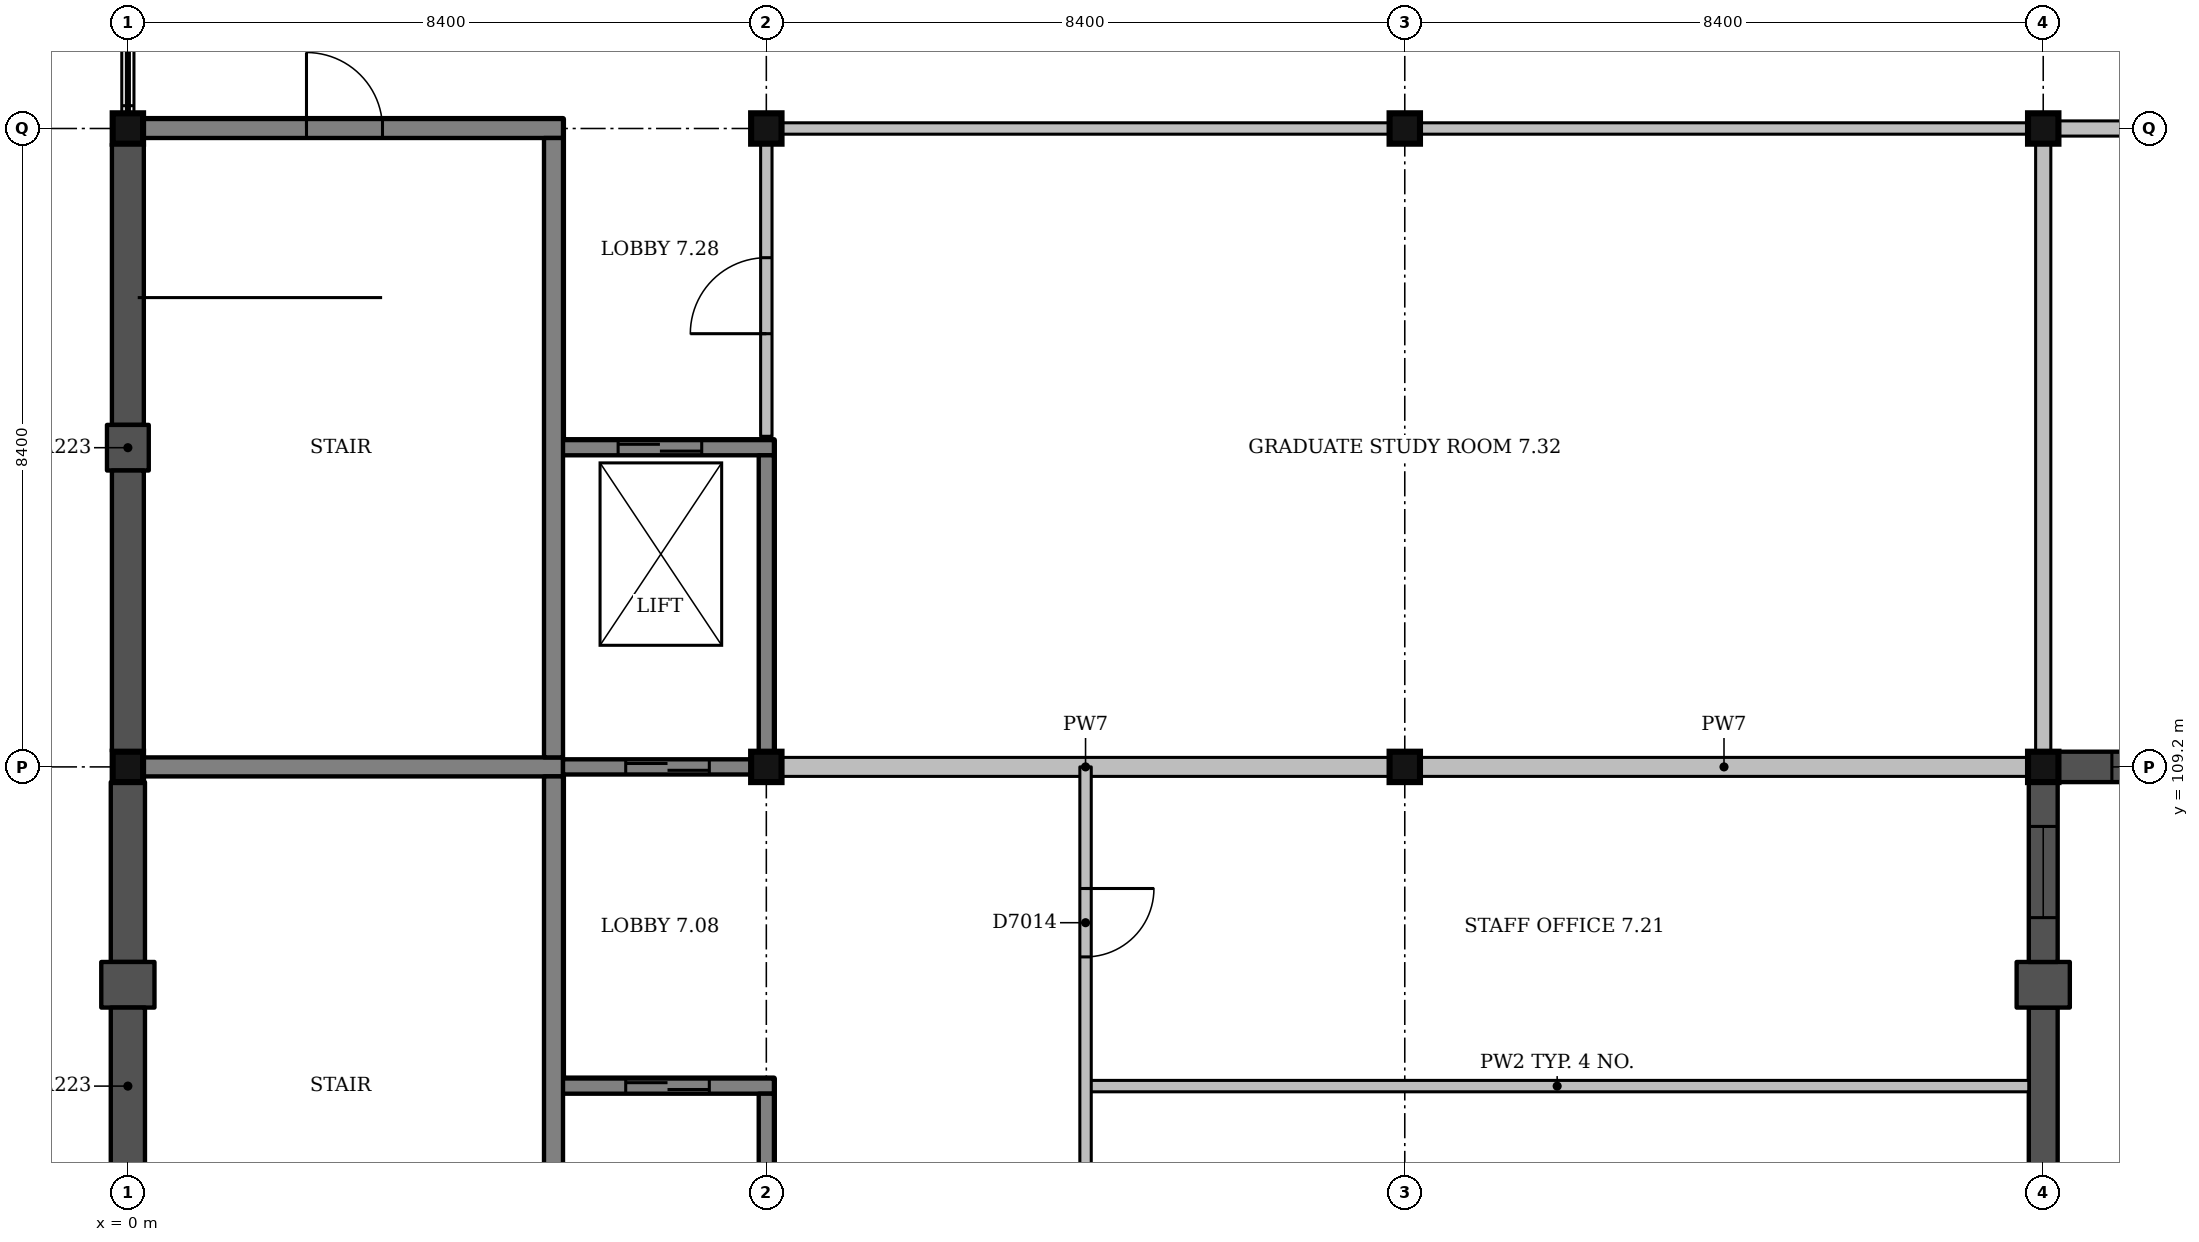
"""IFC4 building model, lengths in metres.
Left out: names, types, materials, properties, quantities, classifications, styles, units other than length and angle.
Written with IfcOpenShell. Run it as: python <this file> out.ifc"""

import sys

from ifc_helpers import new_model, si_unit, direction, frame, frame_2d, origin, origin_2d, place, context, subcontext, project, spatial, rectangle, extrude, element, fill, save


model = new_model("IFC4")
c1 = context("Model", 3, precision=1e-05, world=origin(), true_north=direction((0.0, 1.0)))
c2 = subcontext(c1, "Body", "Model", "MODEL_VIEW")
j1 = project(units=[si_unit("LENGTHUNIT", "METRE"), si_unit("PLANEANGLEUNIT", "RADIAN")], contexts=[c1])
p1 = place(None, origin())
s1 = spatial("IfcSite", under=j1, at=p1, CompositionType="ELEMENT")
p2 = place(p1, origin())
s2 = spatial("IfcBuilding", under=s1, at=p2, CompositionType="ELEMENT")
p3 = place(p2, frame((0.0, 0.0, 31.5)))
s3 = spatial("IfcBuildingStorey", under=s2, at=p3, CompositionType="ELEMENT", Elevation=31.5)
for number, where, z_axis, x_axis in (
    (1, (0.0, 109.2, 0.0), (0.0, 0.0, 1.0), (1.0, 0.0, 0.0)),
    (2, (8.4, 109.2, 0.0), (0.0, 0.0, 1.0), (1.0, 0.0, 0.0)),
    (3, (16.8, 109.2, 0.0), (0.0, 0.0, 1.0), (1.0, 0.0, 0.0)),
    (4, (25.2, 109.2, 0.0), (0.0, 0.0, 1.0), (1.0, 0.0, 0.0)),
    (5, (0.0, 117.6, 0.0), (0.0, 0.0, 1.0), (1.0, 0.0, 0.0)),
    (6, (8.4, 117.6, 0.0), (0.0, 0.0, 1.0), (1.0, 0.0, 0.0)),
    (7, (16.8, 117.6, 0.0), (0.0, 0.0, 1.0), (1.0, 0.0, 0.0)),
    (8, (25.2, 117.6, 0.0), (0.0, 0.0, 1.0), (1.0, 0.0, 0.0)),
):
    element("IfcColumn", number, at=place(p3, frame(where, z_axis=z_axis, x_axis=x_axis)), inside=s3, PredefinedType="COLUMN", context=c2, shape_type="SweptSolid", body=[
        extrude(rectangle(XDim=0.4, YDim=0.4, at=origin_2d()), origin(), (0.0, 0.0, 1.0), 4.5),
    ])
p4 = place(p3, frame((5.5, 105.0, 0.0), z_axis=(0.0, 0.0, 1.0), x_axis=(1.0, 0.0, 0.0)))
e9 = element("IfcWall", 9, at=p4, inside=s3, PredefinedType="SHEAR", context=c2, shape_type="SweptSolid", body=[
    extrude(rectangle(XDim=3.0, YDim=0.2, at=frame_2d((1.5, 0.0))), origin(), (0.0, 0.0, 1.0), 4.5),
])
p5 = place(p4, frame((1.05, 0.0, 0.0)))
e10 = element("IfcOpeningElement", 10, at=p5, cuts=e9, PredefinedType="OPENING", context=c2, shape_type="SweptSolid", body=[
    extrude(rectangle(XDim=1.1, YDim=2.1, at=frame_2d((0.55, 1.05))), frame((0.0, 0.11, 0.0), z_axis=(0.0, -1.0, 0.0), x_axis=(1.0, 0.0, 0.0)), (0.0, 0.0, 1.0), 0.22),
])
p6 = place(p3, frame((8.4, 101.0, 0.0), z_axis=(0.0, 0.0, 1.0), x_axis=(0.0, 1.0, 0.0)))
e11 = element("IfcWall", 11, at=p6, inside=s3, PredefinedType="SHEAR", context=c2, shape_type="SweptSolid", body=[
    extrude(rectangle(XDim=3.9, YDim=0.2, at=frame_2d((1.95, 0.0))), origin(), (0.0, 0.0, 1.0), 4.5),
])
p7 = place(p3, frame((5.5, 113.4, 0.0), z_axis=(0.0, 0.0, 1.0), x_axis=(1.0, 0.0, 0.0)))
e12 = element("IfcWall", 12, at=p7, inside=s3, PredefinedType="SHEAR", context=c2, shape_type="SweptSolid", body=[
    extrude(rectangle(XDim=3.0, YDim=0.2, at=frame_2d((1.5, 0.0))), origin(), (0.0, 0.0, 1.0), 4.5),
])
p8 = place(p7, frame((0.95, 0.0, 0.0)))
e13 = element("IfcOpeningElement", 13, at=p8, cuts=e12, PredefinedType="OPENING", context=c2, shape_type="SweptSolid", body=[
    extrude(rectangle(XDim=1.1, YDim=2.1, at=frame_2d((0.55, 1.05))), frame((0.0, 0.11, 0.0), z_axis=(0.0, -1.0, 0.0), x_axis=(1.0, 0.0, 0.0)), (0.0, 0.0, 1.0), 0.22),
])
p9 = place(p3, frame((8.4, 109.4, 0.0), z_axis=(0.0, 0.0, 1.0), x_axis=(0.0, 1.0, 0.0)))
e14 = element("IfcWall", 14, at=p9, inside=s3, PredefinedType="SHEAR", context=c2, shape_type="SweptSolid", body=[
    extrude(rectangle(XDim=3.9, YDim=0.2, at=frame_2d((1.95, 0.0))), origin(), (0.0, 0.0, 1.0), 4.5),
])
p10 = place(p3, frame((0.2, 109.2, 0.0), z_axis=(0.0, 0.0, 1.0), x_axis=(1.0, 0.0, 0.0)))
e15 = element("IfcWall", 15, at=p10, inside=s3, PredefinedType="SHEAR", context=c2, shape_type="SweptSolid", body=[
    extrude(rectangle(XDim=5.525, YDim=0.25, at=frame_2d((2.763, 0.0))), origin(), (0.0, 0.0, 1.0), 4.2),
])
p11 = place(p3, frame((5.6, 100.925, 0.0), z_axis=(0.0, 0.0, 1.0), x_axis=(0.0, 1.0, 0.0)))
e16 = element("IfcWall", 16, at=p11, inside=s3, PredefinedType="SHEAR", context=c2, shape_type="SweptSolid", body=[
    extrude(rectangle(XDim=8.15, YDim=0.25, at=frame_2d((4.075, 0.0))), origin(), (0.0, 0.0, 1.0), 4.2),
])
p12 = place(p3, frame((0.2, 117.6, 0.0), z_axis=(0.0, 0.0, 1.0), x_axis=(1.0, 0.0, 0.0)))
e17 = element("IfcWall", 17, at=p12, inside=s3, PredefinedType="SHEAR", context=c2, shape_type="SweptSolid", body=[
    extrude(rectangle(XDim=5.525, YDim=0.25, at=frame_2d((2.763, 0.0))), origin(), (0.0, 0.0, 1.0), 4.2),
])
p13 = place(p12, frame((2.15, 0.0, 0.0)))
e18 = element("IfcOpeningElement", 18, at=p13, cuts=e17, PredefinedType="OPENING", context=c2, shape_type="SweptSolid", body=[
    extrude(rectangle(XDim=1.0, YDim=2.1, at=frame_2d((0.5, 1.05))), frame((0.0, 0.135, 0.0), z_axis=(0.0, -1.0, 0.0), x_axis=(1.0, 0.0, 0.0)), (0.0, 0.0, 1.0), 0.27),
])
p14 = place(p3, frame((5.6, 109.325, 0.0), z_axis=(0.0, 0.0, 1.0), x_axis=(0.0, 1.0, 0.0)))
e19 = element("IfcWall", 19, at=p14, inside=s3, PredefinedType="SHEAR", context=c2, shape_type="SweptSolid", body=[
    extrude(rectangle(XDim=8.15, YDim=0.25, at=frame_2d((4.075, 0.0))), origin(), (0.0, 0.0, 1.0), 4.2),
])
p15 = place(p3, frame((25.2, 103.967, 0.0), z_axis=(0.0, 0.0, 1.0), x_axis=(0.0, 1.0, 0.0)))
e20 = element("IfcWall", 20, at=p15, inside=s3, PredefinedType="SOLIDWALL", context=c2, shape_type="SweptSolid", body=[
    extrude(rectangle(XDim=2.066, YDim=0.38, at=frame_2d((1.033, 0.0))), origin(), (0.0, 0.0, 1.0), 3.6),
])
p16 = place(p3, frame((25.2, 106.033, 0.0), z_axis=(0.0, 0.0, 1.0), x_axis=(0.0, 1.0, 0.0)))
e21 = element("IfcWall", 21, at=p16, inside=s3, PredefinedType="SOLIDWALL", context=c2, shape_type="SweptSolid", body=[
    extrude(rectangle(XDim=0.6, YDim=0.7, at=frame_2d((0.3, 0.0))), origin(), (0.0, 0.0, 1.0), 3.6),
])
p17 = place(p3, frame((25.2, 106.633, 0.0), z_axis=(0.0, 0.0, 1.0), x_axis=(0.0, 1.0, 0.0)))
e22 = element("IfcWall", 22, at=p17, inside=s3, PredefinedType="SOLIDWALL", context=c2, shape_type="SweptSolid", body=[
    extrude(rectangle(XDim=2.367, YDim=0.38, at=frame_2d((1.183, 0.0))), origin(), (0.0, 0.0, 1.0), 3.6),
])
p18 = place(p17, frame((0.583, 0.0, 0.9)))
e23 = element("IfcOpeningElement", 23, at=p18, cuts=e22, PredefinedType="OPENING", context=c2, shape_type="SweptSolid", body=[
    extrude(rectangle(XDim=1.2, YDim=2.1, at=frame_2d((0.6, 1.05))), frame((0.0, 0.2, 0.0), z_axis=(0.0, -1.0, 0.0), x_axis=(1.0, 0.0, 0.0)), (0.0, 0.0, 1.0), 0.4),
])
p19 = place(p3, frame((0.0, 109.0, 0.0), z_axis=(0.0, 0.0, 1.0), x_axis=(0.0, -1.0, 0.0)))
e24 = element("IfcWall", 24, at=p19, inside=s3, PredefinedType="SOLIDWALL", context=c2, shape_type="SweptSolid", body=[
    extrude(rectangle(XDim=2.367, YDim=0.45, at=frame_2d((1.183, 0.0))), origin(), (0.0, 0.0, 1.0), 4.2),
])
p20 = place(p3, frame((0.0, 106.633, 0.0), z_axis=(0.0, 0.0, 1.0), x_axis=(0.0, -1.0, 0.0)))
e25 = element("IfcWall", 25, at=p20, inside=s3, PredefinedType="SOLIDWALL", context=c2, shape_type="SweptSolid", body=[
    extrude(rectangle(XDim=0.6, YDim=0.7, at=frame_2d((0.3, 0.0))), origin(), (0.0, 0.0, 1.0), 4.2),
])
p21 = place(p3, frame((0.0, 106.033, 0.0), z_axis=(0.0, 0.0, 1.0), x_axis=(0.0, -1.0, 0.0)))
e26 = element("IfcWall", 26, at=p21, inside=s3, PredefinedType="SOLIDWALL", context=c2, shape_type="SweptSolid", body=[
    extrude(rectangle(XDim=2.066, YDim=0.45, at=frame_2d((1.033, 0.0))), origin(), (0.0, 0.0, 1.0), 4.2),
])
p22 = place(p3, frame((0.0, 117.4, 0.0), z_axis=(0.0, 0.0, 1.0), x_axis=(0.0, -1.0, 0.0)))
e27 = element("IfcWall", 27, at=p22, inside=s3, PredefinedType="SOLIDWALL", context=c2, shape_type="SweptSolid", body=[
    extrude(rectangle(XDim=3.7, YDim=0.42, at=frame_2d((1.85, 0.0))), origin(), (0.0, 0.0, 1.0), 4.2),
])
p23 = place(p3, frame((0.0, 113.7, 0.0), z_axis=(0.0, 0.0, 1.0), x_axis=(0.0, -1.0, 0.0)))
e28 = element("IfcWall", 28, at=p23, inside=s3, PredefinedType="SOLIDWALL", context=c2, shape_type="SweptSolid", body=[
    extrude(rectangle(XDim=0.6, YDim=0.55, at=frame_2d((0.3, 0.0))), origin(), (0.0, 0.0, 1.0), 4.2),
])
p24 = place(p3, frame((0.0, 113.1, 0.0), z_axis=(0.0, 0.0, 1.0), x_axis=(0.0, -1.0, 0.0)))
e29 = element("IfcWall", 29, at=p24, inside=s3, PredefinedType="SOLIDWALL", context=c2, shape_type="SweptSolid", body=[
    extrude(rectangle(XDim=3.7, YDim=0.42, at=frame_2d((1.85, 0.0))), origin(), (0.0, 0.0, 1.0), 4.2),
])
p25 = place(p3, frame((25.4, 109.2, 0.0), z_axis=(0.0, 0.0, 1.0), x_axis=(1.0, 0.0, 0.0)))
e30 = element("IfcWall", 30, at=p25, inside=s3, PredefinedType="SOLIDWALL", context=c2, shape_type="SweptSolid", body=[
    extrude(rectangle(XDim=2.607, YDim=0.4, at=frame_2d((1.303, 0.0))), origin(), (0.0, 0.0, 1.0), 4.2),
])
p26 = place(p25, frame((0.703, 0.0, 2.4)))
e31 = element("IfcOpeningElement", 31, at=p26, cuts=e30, PredefinedType="OPENING", context=c2, shape_type="SweptSolid", body=[
    extrude(rectangle(XDim=1.2, YDim=0.6, at=frame_2d((0.6, 0.3))), frame((0.0, 0.21, 0.0), z_axis=(0.0, -1.0, 0.0), x_axis=(1.0, 0.0, 0.0)), (0.0, 0.0, 1.0), 0.42),
])
p27 = place(p3, frame((12.6, 105.0, 0.0), z_axis=(0.0, 0.0, 1.0), x_axis=(1.0, 0.0, 0.0)))
e32 = element("IfcWall", 32, at=p27, inside=s3, PredefinedType="PARTITIONING", context=c2, shape_type="SweptSolid", body=[
    extrude(rectangle(XDim=12.41, YDim=0.15, at=frame_2d((6.205, 0.0))), origin(), (0.0, 0.0, 1.0), 3.6),
])
p28 = place(p3, frame((8.6, 109.2, 0.0), z_axis=(0.0, 0.0, 1.0), x_axis=(1.0, 0.0, 0.0)))
e33 = element("IfcWall", 33, at=p28, inside=s3, PredefinedType="SOLIDWALL", context=c2, shape_type="SweptSolid", body=[
    extrude(rectangle(XDim=8.0, YDim=0.25, at=frame_2d((4.0, 0.0))), origin(), (0.0, 0.0, 1.0), 4.15),
])
p29 = place(p3, frame((17.0, 109.2, 0.0), z_axis=(0.0, 0.0, 1.0), x_axis=(1.0, 0.0, 0.0)))
e34 = element("IfcWall", 34, at=p29, inside=s3, PredefinedType="SOLIDWALL", context=c2, shape_type="SweptSolid", body=[
    extrude(rectangle(XDim=8.0, YDim=0.25, at=frame_2d((4.0, 0.0))), origin(), (0.0, 0.0, 1.0), 3.6),
])
for number, where, z_axis, x_axis in (
    (35, (8.6, 117.6, 0.0), (0.0, 0.0, 1.0), (1.0, 0.0, 0.0)),
    (36, (17.0, 117.6, 0.0), (0.0, 0.0, 1.0), (1.0, 0.0, 0.0)),
):
    element("IfcWall", number, at=place(p3, frame(where, z_axis=z_axis, x_axis=x_axis)), inside=s3, PredefinedType="PARTITIONING", context=c2, shape_type="SweptSolid", body=[
        extrude(rectangle(XDim=8.0, YDim=0.15, at=frame_2d((4.0, 0.0))), origin(), (0.0, 0.0, 1.0), 3.6),
    ])
p30 = place(p3, frame((25.4, 117.6, 0.0), z_axis=(0.0, 0.0, 1.0), x_axis=(1.0, 0.0, 0.0)))
e37 = element("IfcWall", 37, at=p30, inside=s3, PredefinedType="PARTITIONING", context=c2, shape_type="SweptSolid", body=[
    extrude(rectangle(XDim=8.0, YDim=0.2, at=frame_2d((4.0, 0.0))), origin(), (0.0, 0.0, 1.0), 3.6),
])
p31 = place(p30, frame((3.45, 0.0, 0.0)))
e38 = element("IfcOpeningElement", 38, at=p31, cuts=e37, PredefinedType="OPENING", context=c2, shape_type="SweptSolid", body=[
    extrude(rectangle(XDim=1.0, YDim=2.1, at=frame_2d((0.5, 1.05))), frame((0.0, 0.11, 0.0), z_axis=(0.0, -1.0, 0.0), x_axis=(1.0, 0.0, 0.0)), (0.0, 0.0, 1.0), 0.22),
])
p32 = place(p3, frame((8.4, 113.55, 0.0), z_axis=(0.0, 0.0, 1.0), x_axis=(0.0, 1.0, 0.0)))
e39 = element("IfcWall", 39, at=p32, inside=s3, PredefinedType="PARTITIONING", context=c2, shape_type="SweptSolid", body=[
    extrude(rectangle(XDim=3.85, YDim=0.15, at=frame_2d((1.925, 0.0))), origin(), (0.0, 0.0, 1.0), 3.6),
])
p33 = place(p32, frame((1.35, 0.0, 0.0)))
e40 = element("IfcOpeningElement", 40, at=p33, cuts=e39, PredefinedType="OPENING", context=c2, shape_type="SweptSolid", body=[
    extrude(rectangle(XDim=1.0, YDim=2.1, at=frame_2d((0.5, 1.05))), frame((0.0, 0.085, 0.0), z_axis=(0.0, -1.0, 0.0), x_axis=(1.0, 0.0, 0.0)), (0.0, 0.0, 1.0), 0.17),
])
p34 = place(p3, frame((12.6, 100.8, 0.0), z_axis=(0.0, 0.0, 1.0), x_axis=(0.0, 1.0, 0.0)))
e41 = element("IfcWall", 41, at=p34, inside=s3, PredefinedType="PARTITIONING", context=c2, shape_type="SweptSolid", body=[
    extrude(rectangle(XDim=8.4, YDim=0.15, at=frame_2d((4.2, 0.0))), origin(), (0.0, 0.0, 1.0), 3.6),
])
p35 = place(p34, frame((1.7, 0.0, 0.0)))
e42 = element("IfcOpeningElement", 42, at=p35, cuts=e41, PredefinedType="OPENING", context=c2, shape_type="SweptSolid", body=[
    extrude(rectangle(XDim=0.9, YDim=2.1, at=frame_2d((0.45, 1.05))), frame((0.0, 0.085, 0.0), z_axis=(0.0, -1.0, 0.0), x_axis=(1.0, 0.0, 0.0)), (0.0, 0.0, 1.0), 0.17),
])
p36 = place(p34, frame((5.9, 0.0, 0.0)))
e43 = element("IfcOpeningElement", 43, at=p36, cuts=e41, PredefinedType="OPENING", context=c2, shape_type="SweptSolid", body=[
    extrude(rectangle(XDim=0.9, YDim=2.1, at=frame_2d((0.45, 1.05))), frame((0.0, 0.085, 0.0), z_axis=(0.0, -1.0, 0.0), x_axis=(1.0, 0.0, 0.0)), (0.0, 0.0, 1.0), 0.17),
])
p37 = place(p3, frame((25.2, 109.4, 0.0), z_axis=(0.0, 0.0, 1.0), x_axis=(0.0, 1.0, 0.0)))
e44 = element("IfcWall", 44, at=p37, inside=s3, PredefinedType="PARTITIONING", context=c2, shape_type="SweptSolid", body=[
    extrude(rectangle(XDim=8.0, YDim=0.2, at=frame_2d((4.0, 0.0))), origin(), (0.0, 0.0, 1.0), 4.15),
])
p38 = place(p3, frame((5.725, 109.2, 0.0), z_axis=(0.0, 0.0, 1.0), x_axis=(1.0, 0.0, 0.0)))
e45 = element("IfcWall", 45, at=p38, inside=s3, PredefinedType="SHEAR", context=c2, shape_type="SweptSolid", body=[
    extrude(rectangle(XDim=2.475, YDim=0.2, at=frame_2d((1.237, 0.0))), origin(), (0.0, 0.0, 1.0), 4.5),
])
p39 = place(p38, frame((0.825, 0.0, 0.0)))
e46 = element("IfcOpeningElement", 46, at=p39, cuts=e45, PredefinedType="OPENING", context=c2, shape_type="SweptSolid", body=[
    extrude(rectangle(XDim=1.1, YDim=2.1, at=frame_2d((0.55, 1.05))), frame((0.0, 0.11, 0.0), z_axis=(0.0, -1.0, 0.0), x_axis=(1.0, 0.0, 0.0)), (0.0, 0.0, 1.0), 0.22),
])
p40 = place(p18, origin())
e47 = element("IfcWindow", 47, at=p40, inside=s3, PartitioningType="SINGLE_PANEL", PredefinedType="WINDOW", context=c2, shape_type="SweptSolid", body=[
    extrude(rectangle(XDim=1.2, YDim=2.1, at=frame_2d((0.6, 1.05))), frame((0.0, 0.15, 0.0), z_axis=(0.0, -1.0, 0.0), x_axis=(1.0, 0.0, 0.0)), (0.0, 0.0, 1.0), 0.06),
])
fill(e23, e47)
p41 = place(p26, origin())
e48 = element("IfcWindow", 48, at=p41, inside=s3, PartitioningType="SINGLE_PANEL", PredefinedType="WINDOW", context=c2, shape_type="SweptSolid", body=[
    extrude(rectangle(XDim=1.2, YDim=0.6, at=frame_2d((0.6, 0.3))), frame((0.0, 0.16, 0.0), z_axis=(0.0, -1.0, 0.0), x_axis=(1.0, 0.0, 0.0)), (0.0, 0.0, 1.0), 0.06),
])
fill(e31, e48)
p42 = place(p36, origin())
e49 = element("IfcDoor", 49, at=p42, inside=s3, OperationType="SINGLE_SWING_RIGHT", PredefinedType="DOOR", context=c2, shape_type="SweptSolid", body=[
    extrude(rectangle(XDim=0.9, YDim=2.1, at=frame_2d((0.45, 1.05))), frame((0.0, 0.025, 0.0), z_axis=(0.0, -1.0, 0.0), x_axis=(1.0, 0.0, 0.0)), (0.0, 0.0, 1.0), 0.05),
])
fill(e43, e49)
p43 = place(p33, origin())
e50 = element("IfcDoor", 50, at=p43, inside=s3, OperationType="SINGLE_SWING_LEFT", PredefinedType="DOOR", context=c2, shape_type="SweptSolid", body=[
    extrude(rectangle(XDim=1.0, YDim=2.1, at=frame_2d((0.5, 1.05))), frame((0.0, 0.025, 0.0), z_axis=(0.0, -1.0, 0.0), x_axis=(1.0, 0.0, 0.0)), (0.0, 0.0, 1.0), 0.05),
])
fill(e40, e50)
p44 = place(p13, origin())
e51 = element("IfcDoor", 51, at=p44, inside=s3, OperationType="SINGLE_SWING_LEFT", PredefinedType="DOOR", context=c2, shape_type="SweptSolid", body=[
    extrude(rectangle(XDim=1.0, YDim=2.1, at=frame_2d((0.5, 1.05))), frame((0.0, 0.025, 0.0), z_axis=(0.0, -1.0, 0.0), x_axis=(1.0, 0.0, 0.0)), (0.0, 0.0, 1.0), 0.05),
])
fill(e18, e51)
p45 = place(p5, origin())
e52 = element("IfcDoor", 52, at=p45, inside=s3, OperationType="SLIDING_TO_RIGHT", PredefinedType="DOOR", context=c2, shape_type="SweptSolid", body=[
    extrude(rectangle(XDim=1.1, YDim=2.1, at=frame_2d((0.55, 1.05))), frame((0.0, 0.025, 0.0), z_axis=(0.0, -1.0, 0.0), x_axis=(1.0, 0.0, 0.0)), (0.0, 0.0, 1.0), 0.05),
])
fill(e10, e52)
p46 = place(p39, origin())
e53 = element("IfcDoor", 53, at=p46, inside=s3, OperationType="SLIDING_TO_LEFT", PredefinedType="DOOR", context=c2, shape_type="SweptSolid", body=[
    extrude(rectangle(XDim=1.1, YDim=2.1, at=frame_2d((0.55, 1.05))), frame((0.0, 0.025, 0.0), z_axis=(0.0, -1.0, 0.0), x_axis=(1.0, 0.0, 0.0)), (0.0, 0.0, 1.0), 0.05),
])
fill(e46, e53)
p47 = place(p8, origin())
e54 = element("IfcDoor", 54, at=p47, inside=s3, OperationType="SLIDING_TO_RIGHT", PredefinedType="DOOR", context=c2, shape_type="SweptSolid", body=[
    extrude(rectangle(XDim=1.1, YDim=2.1, at=frame_2d((0.55, 1.05))), frame((0.0, 0.025, 0.0), z_axis=(0.0, -1.0, 0.0), x_axis=(1.0, 0.0, 0.0)), (0.0, 0.0, 1.0), 0.05),
])
fill(e13, e54)
p48 = place(p2, frame((0.0, 0.0, 36.0)))
p49 = place(p48, frame((0.0, 0.0, 1.3)))
p50 = place(p49, frame((7.0, 111.3, 0.0)))
p51 = place(p50, frame((0.0, 0.0, 0.15)))
e55 = element("IfcWindow", 55, at=p51, inside=s3, PartitioningType="SINGLE_PANEL", PredefinedType="SKYLIGHT", context=c2, shape_type="SweptSolid", body=[
    extrude(rectangle(XDim=0.9, YDim=1.2, at=origin_2d()), origin(), (0.0, 0.0, 1.0), 0.05),
])
save(model, sys.argv[1])
